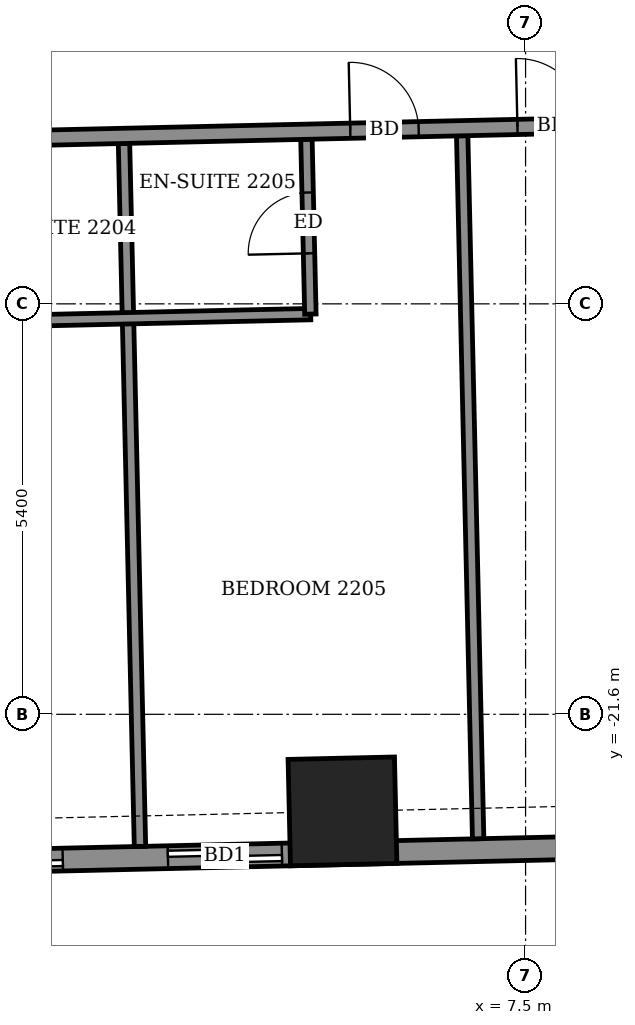
"""IFC4 building model, lengths in metres.
Left out: names, types, materials, properties, quantities, classifications, styles, units other than length and angle.
Written with IfcOpenShell. Run it as: python <this file> out.ifc"""

import sys

from ifc_helpers import new_model, si_unit, direction, frame, frame_2d, origin, origin_2d, place, context, subcontext, project, spatial, rectangle, extrude, element, fill, save


model = new_model("IFC4")
c1 = context("Model", 3, precision=1e-05, world=origin(), true_north=direction((0.0, 1.0)))
c2 = subcontext(c1, "Body", "Model", "MODEL_VIEW")
j1 = project(units=[si_unit("LENGTHUNIT", "METRE"), si_unit("PLANEANGLEUNIT", "RADIAN")], contexts=[c1])
p1 = place(None, origin())
s1 = spatial("IfcSite", under=j1, at=p1, CompositionType="ELEMENT")
p2 = place(p1, origin())
s2 = spatial("IfcBuilding", under=s1, at=p2, CompositionType="ELEMENT")
p3 = place(p2, frame((0.0, 0.0, 90.1)))
s3 = spatial("IfcBuildingStorey", under=s2, at=p3, CompositionType="ELEMENT", Elevation=90.1)
p4 = place(p3, frame((5.091, -22.877, -0.55), z_axis=(0.0, 0.0, 1.0), x_axis=(0.999743536241, 0.022646451015, 0.0)))
e1 = element("IfcColumn", 1, at=p4, inside=s3, PredefinedType="COLUMN", context=c2, shape_type="SweptSolid", body=[
    extrude(rectangle(XDim=1.4, YDim=1.4, at=origin_2d()), origin(), (0.0, 0.0, 1.0), 3.6),
])
p5 = place(p3, frame((-21.409, -24.029, 0.0), z_axis=(0.0, 0.0, 1.0), x_axis=(0.999742634032, 0.022686244721, 0.0)))
e2 = element("IfcWall", 2, at=p5, inside=s3, PredefinedType="SOLIDWALL", context=c2, shape_type="SweptSolid", body=[
    extrude(rectangle(XDim=46.372, YDim=0.3, at=frame_2d((23.186, 0.0))), origin(), (0.0, 0.0, 1.0), 3.05),
])
p6 = place(p5, frame((2.686, 0.0, 0.0)))
e3 = element("IfcOpeningElement", 3, at=p6, cuts=e2, PredefinedType="OPENING", context=c2, shape_type="SweptSolid", body=[
    extrude(rectangle(XDim=1.5, YDim=2.4, at=frame_2d((0.75, 1.2))), frame((0.0, 0.16, 0.0), z_axis=(0.0, -1.0, 0.0), x_axis=(1.0, 0.0, 0.0)), (0.0, 0.0, 1.0), 0.32),
])
p7 = place(p5, frame((7.959, 0.0, 0.0)))
e4 = element("IfcOpeningElement", 4, at=p7, cuts=e2, PredefinedType="OPENING", context=c2, shape_type="SweptSolid", body=[
    extrude(rectangle(XDim=1.5, YDim=2.4, at=frame_2d((0.75, 1.2))), frame((0.0, 0.16, 0.0), z_axis=(0.0, -1.0, 0.0), x_axis=(1.0, 0.0, 0.0)), (0.0, 0.0, 1.0), 0.32),
])
p8 = place(p5, frame((10.842, 0.0, 0.0)))
e5 = element("IfcOpeningElement", 5, at=p8, cuts=e2, PredefinedType="OPENING", context=c2, shape_type="SweptSolid", body=[
    extrude(rectangle(XDim=1.5, YDim=2.4, at=frame_2d((0.75, 1.2))), frame((0.0, 0.16, 0.0), z_axis=(0.0, -1.0, 0.0), x_axis=(1.0, 0.0, 0.0)), (0.0, 0.0, 1.0), 0.32),
])
p9 = place(p5, frame((16.3, 0.0, 0.0)))
e6 = element("IfcOpeningElement", 6, at=p9, cuts=e2, PredefinedType="OPENING", context=c2, shape_type="SweptSolid", body=[
    extrude(rectangle(XDim=1.5, YDim=2.4, at=frame_2d((0.75, 1.2))), frame((0.0, 0.16, 0.0), z_axis=(0.0, -1.0, 0.0), x_axis=(1.0, 0.0, 0.0)), (0.0, 0.0, 1.0), 0.32),
])
p10 = place(p5, frame((21.326, 0.0, 0.0)))
e7 = element("IfcOpeningElement", 7, at=p10, cuts=e2, PredefinedType="OPENING", context=c2, shape_type="SweptSolid", body=[
    extrude(rectangle(XDim=1.5, YDim=2.4, at=frame_2d((0.75, 1.2))), frame((0.0, 0.16, 0.0), z_axis=(0.0, -1.0, 0.0), x_axis=(1.0, 0.0, 0.0)), (0.0, 0.0, 1.0), 0.32),
])
p11 = place(p5, frame((24.21, 0.0, 0.0)))
e8 = element("IfcOpeningElement", 8, at=p11, cuts=e2, PredefinedType="OPENING", context=c2, shape_type="SweptSolid", body=[
    extrude(rectangle(XDim=1.5, YDim=2.4, at=frame_2d((0.75, 1.2))), frame((0.0, 0.16, 0.0), z_axis=(0.0, -1.0, 0.0), x_axis=(1.0, 0.0, 0.0)), (0.0, 0.0, 1.0), 0.32),
])
p12 = place(p5, frame((29.769, 0.0, 0.0)))
e9 = element("IfcOpeningElement", 9, at=p12, cuts=e2, PredefinedType="OPENING", context=c2, shape_type="SweptSolid", body=[
    extrude(rectangle(XDim=1.5, YDim=2.4, at=frame_2d((0.75, 1.2))), frame((0.0, 0.16, 0.0), z_axis=(0.0, -1.0, 0.0), x_axis=(1.0, 0.0, 0.0)), (0.0, 0.0, 1.0), 0.32),
])
p13 = place(p5, frame((34.819, 0.0, 0.0)))
e10 = element("IfcOpeningElement", 10, at=p13, cuts=e2, PredefinedType="OPENING", context=c2, shape_type="SweptSolid", body=[
    extrude(rectangle(XDim=1.5, YDim=2.4, at=frame_2d((0.75, 1.2))), frame((0.0, 0.16, 0.0), z_axis=(0.0, -1.0, 0.0), x_axis=(1.0, 0.0, 0.0)), (0.0, 0.0, 1.0), 0.32),
])
p14 = place(p5, frame((37.852, 0.0, 0.0)))
e11 = element("IfcOpeningElement", 11, at=p14, cuts=e2, PredefinedType="OPENING", context=c2, shape_type="SweptSolid", body=[
    extrude(rectangle(XDim=1.2, YDim=2.4, at=frame_2d((0.6, 1.2))), frame((0.0, 0.16, 0.0), z_axis=(0.0, -1.0, 0.0), x_axis=(1.0, 0.0, 0.0)), (0.0, 0.0, 1.0), 0.32),
])
p15 = place(p5, frame((42.373, 0.0, 0.9)))
e12 = element("IfcOpeningElement", 12, at=p15, cuts=e2, PredefinedType="OPENING", context=c2, shape_type="SweptSolid", body=[
    extrude(rectangle(XDim=2.4, YDim=1.5, at=frame_2d((1.2, 0.75))), frame((0.0, 0.16, 0.0), z_axis=(0.0, -1.0, 0.0), x_axis=(1.0, 0.0, 0.0)), (0.0, 0.0, 1.0), 0.32),
])
p16 = place(p3, frame((2.427, -23.338, 0.0), z_axis=(0.0, 0.0, 1.0), x_axis=(-0.022698023584, 0.999742366675, 0.0)))
e13 = element("IfcWall", 13, at=p16, inside=s3, PredefinedType="PARTITIONING", context=c2, shape_type="SweptSolid", body=[
    extrude(rectangle(XDim=9.25, YDim=0.15, at=frame_2d((4.625, 0.0))), origin(), (0.0, 0.0, 1.0), 2.55),
])
p17 = place(p3, frame((6.876, -23.237, 0.0), z_axis=(0.0, 0.0, 1.0), x_axis=(-0.022697424684, 0.999742380272, 0.0)))
e14 = element("IfcWall", 14, at=p17, inside=s3, PredefinedType="PARTITIONING", context=c2, shape_type="SweptSolid", body=[
    extrude(rectangle(XDim=9.25, YDim=0.15, at=frame_2d((4.625, 0.0))), origin(), (0.0, 0.0, 1.0), 2.55),
])
p18 = place(p3, frame((-0.126, -16.444, 0.0), z_axis=(0.0, 0.0, 1.0), x_axis=(0.99974154664, 0.022734113616, 0.0)))
e15 = element("IfcWall", 15, at=p18, inside=s3, PredefinedType="PARTITIONING", context=c2, shape_type="SweptSolid", body=[
    extrude(rectangle(XDim=4.8, YDim=0.15, at=frame_2d((2.4, 0.0))), origin(), (0.0, 0.0, 1.0), 3.05),
])
p19 = place(p3, frame((4.669, -16.335, 0.0), z_axis=(0.0, 0.0, 1.0), x_axis=(-0.022612884682, 0.999744296031, 0.0)))
e16 = element("IfcWall", 16, at=p19, inside=s3, PredefinedType="PARTITIONING", context=c2, shape_type="SweptSolid", body=[
    extrude(rectangle(XDim=2.3, YDim=0.15, at=frame_2d((1.15, 0.0))), origin(), (0.0, 0.0, 1.0), 3.05),
])
p20 = place(p19, frame((0.8, 0.0, 0.0)))
e17 = element("IfcOpeningElement", 17, at=p20, cuts=e16, PredefinedType="OPENING", context=c2, shape_type="SweptSolid", body=[
    extrude(rectangle(XDim=0.8, YDim=2.1, at=frame_2d((0.4, 1.05))), frame((0.0, 0.085, 0.0), z_axis=(0.0, -1.0, 0.0), x_axis=(1.0, 0.0, 0.0)), (0.0, 0.0, 1.0), 0.17),
])
p21 = place(p3, frame((-24.274, -14.591, 0.0), z_axis=(0.0, 0.0, 1.0), x_axis=(0.999742718753, 0.022682510909, 0.0)))
e18 = element("IfcWall", 18, at=p21, inside=s3, PredefinedType="PARTITIONING", context=c2, shape_type="SweptSolid", body=[
    extrude(rectangle(XDim=52.471, YDim=0.2, at=frame_2d((26.236, 0.0))), origin(), (0.0, 0.0, 1.0), 3.05),
])
p22 = place(p21, frame((1.525, 0.0, 0.0)))
e19 = element("IfcOpeningElement", 19, at=p22, cuts=e18, PredefinedType="OPENING", context=c2, shape_type="SweptSolid", body=[
    extrude(rectangle(XDim=1.0, YDim=2.1, at=frame_2d((0.5, 1.05))), frame((0.0, 0.11, 0.0), z_axis=(0.0, -1.0, 0.0), x_axis=(1.0, 0.0, 0.0)), (0.0, 0.0, 1.0), 0.22),
])
p23 = place(p21, frame((6.9, 0.0, 0.0)))
e20 = element("IfcOpeningElement", 20, at=p23, cuts=e18, PredefinedType="OPENING", context=c2, shape_type="SweptSolid", body=[
    extrude(rectangle(XDim=0.9, YDim=2.1, at=frame_2d((0.45, 1.05))), frame((0.0, 0.11, 0.0), z_axis=(0.0, -1.0, 0.0), x_axis=(1.0, 0.0, 0.0)), (0.0, 0.0, 1.0), 0.22),
])
p24 = place(p21, frame((11.575, 0.0, 0.0)))
e21 = element("IfcOpeningElement", 21, at=p24, cuts=e18, PredefinedType="OPENING", context=c2, shape_type="SweptSolid", body=[
    extrude(rectangle(XDim=0.9, YDim=2.1, at=frame_2d((0.45, 1.05))), frame((0.0, 0.11, 0.0), z_axis=(0.0, -1.0, 0.0), x_axis=(1.0, 0.0, 0.0)), (0.0, 0.0, 1.0), 0.22),
])
p25 = place(p21, frame((13.6, 0.0, 0.0)))
e22 = element("IfcOpeningElement", 22, at=p25, cuts=e18, PredefinedType="OPENING", context=c2, shape_type="SweptSolid", body=[
    extrude(rectangle(XDim=0.9, YDim=2.1, at=frame_2d((0.45, 1.05))), frame((0.0, 0.11, 0.0), z_axis=(0.0, -1.0, 0.0), x_axis=(1.0, 0.0, 0.0)), (0.0, 0.0, 1.0), 0.22),
])
p26 = place(p21, frame((20.45, 0.0, 0.0)))
e23 = element("IfcOpeningElement", 23, at=p26, cuts=e18, PredefinedType="OPENING", context=c2, shape_type="SweptSolid", body=[
    extrude(rectangle(XDim=0.9, YDim=2.1, at=frame_2d((0.45, 1.05))), frame((0.0, 0.11, 0.0), z_axis=(0.0, -1.0, 0.0), x_axis=(1.0, 0.0, 0.0)), (0.0, 0.0, 1.0), 0.22),
])
p27 = place(p21, frame((22.6, 0.0, 0.0)))
e24 = element("IfcOpeningElement", 24, at=p27, cuts=e18, PredefinedType="OPENING", context=c2, shape_type="SweptSolid", body=[
    extrude(rectangle(XDim=0.9, YDim=2.1, at=frame_2d((0.45, 1.05))), frame((0.0, 0.11, 0.0), z_axis=(0.0, -1.0, 0.0), x_axis=(1.0, 0.0, 0.0)), (0.0, 0.0, 1.0), 0.22),
])
p28 = place(p21, frame((29.475, 0.0, 0.0)))
e25 = element("IfcOpeningElement", 25, at=p28, cuts=e18, PredefinedType="OPENING", context=c2, shape_type="SweptSolid", body=[
    extrude(rectangle(XDim=0.9, YDim=2.1, at=frame_2d((0.45, 1.05))), frame((0.0, 0.11, 0.0), z_axis=(0.0, -1.0, 0.0), x_axis=(1.0, 0.0, 0.0)), (0.0, 0.0, 1.0), 0.22),
])
p29 = place(p21, frame((31.675, 0.0, 0.0)))
e26 = element("IfcOpeningElement", 26, at=p29, cuts=e18, PredefinedType="OPENING", context=c2, shape_type="SweptSolid", body=[
    extrude(rectangle(XDim=0.9, YDim=2.1, at=frame_2d((0.45, 1.05))), frame((0.0, 0.11, 0.0), z_axis=(0.0, -1.0, 0.0), x_axis=(1.0, 0.0, 0.0)), (0.0, 0.0, 1.0), 0.22),
])
p30 = place(p21, frame((38.675, 0.0, 0.0)))
e27 = element("IfcOpeningElement", 27, at=p30, cuts=e18, PredefinedType="OPENING", context=c2, shape_type="SweptSolid", body=[
    extrude(rectangle(XDim=0.9, YDim=2.1, at=frame_2d((0.45, 1.05))), frame((0.0, 0.11, 0.0), z_axis=(0.0, -1.0, 0.0), x_axis=(1.0, 0.0, 0.0)), (0.0, 0.0, 1.0), 0.22),
])
p31 = place(p21, frame((40.675, 0.0, 0.0)))
e28 = element("IfcOpeningElement", 28, at=p31, cuts=e18, PredefinedType="OPENING", context=c2, shape_type="SweptSolid", body=[
    extrude(rectangle(XDim=0.9, YDim=2.1, at=frame_2d((0.45, 1.05))), frame((0.0, 0.11, 0.0), z_axis=(0.0, -1.0, 0.0), x_axis=(1.0, 0.0, 0.0)), (0.0, 0.0, 1.0), 0.22),
])
p32 = place(p21, frame((50.436, 0.0, 0.0)))
e29 = element("IfcOpeningElement", 29, at=p32, cuts=e18, PredefinedType="OPENING", context=c2, shape_type="SweptSolid", body=[
    extrude(rectangle(XDim=1.0, YDim=2.1, at=frame_2d((0.5, 1.05))), frame((0.0, 0.11, 0.0), z_axis=(0.0, -1.0, 0.0), x_axis=(1.0, 0.0, 0.0)), (0.0, 0.0, 1.0), 0.22),
])
p33 = place(p21, frame((45.45, 0.0, 0.0)))
e30 = element("IfcOpeningElement", 30, at=p33, cuts=e18, PredefinedType="OPENING", context=c2, shape_type="SweptSolid", body=[
    extrude(rectangle(XDim=0.9, YDim=2.1, at=frame_2d((0.45, 1.05))), frame((0.0, 0.11, 0.0), z_axis=(0.0, -1.0, 0.0), x_axis=(1.0, 0.0, 0.0)), (0.0, 0.0, 1.0), 0.22),
])
p34 = place(p10, origin())
e31 = element("IfcDoor", 31, at=p34, inside=s3, OperationType="SLIDING_TO_LEFT", PredefinedType="DOOR", context=c2, shape_type="SweptSolid", body=[
    extrude(rectangle(XDim=1.5, YDim=2.4, at=frame_2d((0.75, 1.2))), frame((0.0, 0.025, 0.0), z_axis=(0.0, -1.0, 0.0), x_axis=(1.0, 0.0, 0.0)), (0.0, 0.0, 1.0), 0.05),
])
fill(e7, e31)
p35 = place(p11, origin())
e32 = element("IfcDoor", 32, at=p35, inside=s3, OperationType="SLIDING_TO_LEFT", PredefinedType="DOOR", context=c2, shape_type="SweptSolid", body=[
    extrude(rectangle(XDim=1.5, YDim=2.4, at=frame_2d((0.75, 1.2))), frame((0.0, 0.025, 0.0), z_axis=(0.0, -1.0, 0.0), x_axis=(1.0, 0.0, 0.0)), (0.0, 0.0, 1.0), 0.05),
])
fill(e8, e32)
p36 = place(p28, origin())
e33 = element("IfcDoor", 33, at=p36, inside=s3, OperationType="SINGLE_SWING_LEFT", PredefinedType="DOOR", context=c2, shape_type="SweptSolid", body=[
    extrude(rectangle(XDim=0.9, YDim=2.1, at=frame_2d((0.45, 1.05))), frame((0.0, 0.025, 0.0), z_axis=(0.0, -1.0, 0.0), x_axis=(1.0, 0.0, 0.0)), (0.0, 0.0, 1.0), 0.05),
])
fill(e25, e33)
p37 = place(p20, origin())
e34 = element("IfcDoor", 34, at=p37, inside=s3, OperationType="SINGLE_SWING_LEFT", PredefinedType="DOOR", context=c2, shape_type="SweptSolid", body=[
    extrude(rectangle(XDim=0.8, YDim=2.1, at=frame_2d((0.4, 1.05))), frame((0.0, 0.025, 0.0), z_axis=(0.0, -1.0, 0.0), x_axis=(1.0, 0.0, 0.0)), (0.0, 0.0, 1.0), 0.05),
])
fill(e17, e34)
p38 = place(p29, origin())
e35 = element("IfcDoor", 35, at=p38, inside=s3, OperationType="SINGLE_SWING_RIGHT", PredefinedType="DOOR", context=c2, shape_type="SweptSolid", body=[
    extrude(rectangle(XDim=0.9, YDim=2.1, at=frame_2d((0.45, 1.05))), frame((0.0, 0.025, 0.0), z_axis=(0.0, -1.0, 0.0), x_axis=(1.0, 0.0, 0.0)), (0.0, 0.0, 1.0), 0.05),
])
fill(e26, e35)
save(model, sys.argv[1])
